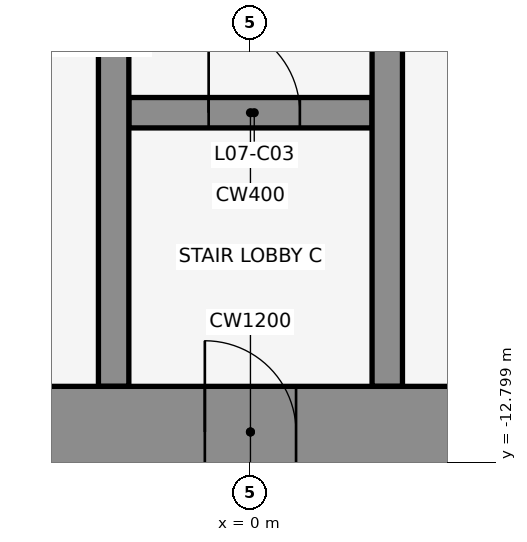
"""IFC4 building model, lengths in metres.
Left out: names, types, materials, properties, quantities, classifications, styles, units other than length and angle.
Written with IfcOpenShell. Run it as: python <this file> out.ifc"""

import sys

from ifc_helpers import new_model, si_unit, direction, frame, frame_2d, origin, place, context, subcontext, project, spatial, rectangle, extrude, element, fill, save


model = new_model("IFC4")
c1 = context("Model", 3, precision=1e-05, world=origin(), true_north=direction((0.0, 1.0)))
c2 = subcontext(c1, "Body", "Model", "MODEL_VIEW")
j1 = project(units=[si_unit("LENGTHUNIT", "METRE"), si_unit("PLANEANGLEUNIT", "RADIAN")], contexts=[c1])
p1 = place(None, origin())
s1 = spatial("IfcSite", under=j1, at=p1, CompositionType="ELEMENT")
p2 = place(p1, origin())
s2 = spatial("IfcBuilding", under=s1, at=p2, CompositionType="ELEMENT")
p3 = place(p2, frame((0.0, 0.0, 39.5)))
s3 = spatial("IfcBuildingStorey", under=s2, at=p3, CompositionType="ELEMENT", Elevation=39.5)
p4 = place(p3, frame((-1.6, -8.2, 0.0), z_axis=(0.0, 0.0, 1.0), x_axis=(1.0, 0.0, 0.0)))
e1 = element("IfcWall", 1, at=p4, inside=s3, PredefinedType="SHEAR", context=c2, shape_type="SweptSolid", body=[
    extrude(rectangle(XDim=3.2, YDim=0.4, at=frame_2d((1.6, 0.0))), origin(), (0.0, 0.0, 1.0), 4.5),
])
p5 = place(p4, frame((1.05, 0.0, 0.0)))
e2 = element("IfcOpeningElement", 2, at=p5, cuts=e1, PredefinedType="OPENING", context=c2, shape_type="SweptSolid", body=[
    extrude(rectangle(XDim=1.2, YDim=2.1, at=frame_2d((0.6, 1.05))), frame((0.0, 0.212, 0.0), z_axis=(0.0, -1.0, 0.0), x_axis=(1.0, 0.0, 0.0)), (0.0, 0.0, 1.0), 0.424),
])
for number, where, z_axis, x_axis in (
    (3, (-1.8, -11.8, 0.0), (0.0, 0.0, 1.0), (0.0, 1.0, 0.0)),
    (4, (1.8, -11.8, 0.0), (0.0, 0.0, 1.0), (0.0, 1.0, 0.0)),
):
    element("IfcWall", number, at=place(p3, frame(where, z_axis=z_axis, x_axis=x_axis)), inside=s3, PredefinedType="SHEAR", context=c2, shape_type="SweptSolid", body=[
        extrude(rectangle(XDim=10.6, YDim=0.4, at=frame_2d((5.3, 0.0))), origin(), (0.0, 0.0, 1.0), 4.5),
    ])
p6 = place(p3, frame((-22.0, -12.4, 0.0), z_axis=(0.0, 0.0, 1.0), x_axis=(1.0, 0.0, 0.0)))
e5 = element("IfcWall", 5, at=p6, inside=s3, PredefinedType="SHEAR", context=c2, shape_type="SweptSolid", body=[
    extrude(rectangle(XDim=44.0, YDim=1.2, at=frame_2d((22.0, 0.0))), origin(), (0.0, 0.0, 1.0), 4.5),
])
p7 = place(p6, frame((2.2, 0.0, 0.0)))
e6 = element("IfcOpeningElement", 6, at=p7, cuts=e5, PredefinedType="OPENING", context=c2, shape_type="SweptSolid", body=[
    extrude(rectangle(XDim=1.2, YDim=2.1, at=frame_2d((0.6, 1.05))), frame((0.0, 0.612, 0.0), z_axis=(0.0, -1.0, 0.0), x_axis=(1.0, 0.0, 0.0)), (0.0, 0.0, 1.0), 1.224),
])
p8 = place(p6, frame((21.4, 0.0, 0.0)))
e7 = element("IfcOpeningElement", 7, at=p8, cuts=e5, PredefinedType="OPENING", context=c2, shape_type="SweptSolid", body=[
    extrude(rectangle(XDim=1.2, YDim=2.1, at=frame_2d((0.6, 1.05))), frame((0.0, 0.612, 0.0), z_axis=(0.0, -1.0, 0.0), x_axis=(1.0, 0.0, 0.0)), (0.0, 0.0, 1.0), 1.224),
])
p9 = place(p6, frame((40.6, 0.0, 0.0)))
e8 = element("IfcOpeningElement", 8, at=p9, cuts=e5, PredefinedType="OPENING", context=c2, shape_type="SweptSolid", body=[
    extrude(rectangle(XDim=1.2, YDim=2.1, at=frame_2d((0.6, 1.05))), frame((0.0, 0.612, 0.0), z_axis=(0.0, -1.0, 0.0), x_axis=(1.0, 0.0, 0.0)), (0.0, 0.0, 1.0), 1.224),
])
p10 = place(p6, frame((16.0, 0.0, 0.0)))
e9 = element("IfcOpeningElement", 9, at=p10, cuts=e5, PredefinedType="OPENING", context=c2, shape_type="SweptSolid", body=[
    extrude(rectangle(XDim=1.8, YDim=2.1, at=frame_2d((0.9, 1.05))), frame((0.0, 0.612, 0.0), z_axis=(0.0, -1.0, 0.0), x_axis=(1.0, 0.0, 0.0)), (0.0, 0.0, 1.0), 1.224),
])
p11 = place(p6, frame((6.3, 0.0, 0.0)))
e10 = element("IfcOpeningElement", 10, at=p11, cuts=e5, PredefinedType="OPENING", context=c2, shape_type="SweptSolid", body=[
    extrude(rectangle(XDim=1.2, YDim=2.1, at=frame_2d((0.6, 1.05))), frame((0.0, 0.612, 0.0), z_axis=(0.0, -1.0, 0.0), x_axis=(1.0, 0.0, 0.0)), (0.0, 0.0, 1.0), 1.224),
])
p12 = place(p6, frame((26.2, 0.0, 0.0)))
e11 = element("IfcOpeningElement", 11, at=p12, cuts=e5, PredefinedType="OPENING", context=c2, shape_type="SweptSolid", body=[
    extrude(rectangle(XDim=1.8, YDim=2.1, at=frame_2d((0.9, 1.05))), frame((0.0, 0.612, 0.0), z_axis=(0.0, -1.0, 0.0), x_axis=(1.0, 0.0, 0.0)), (0.0, 0.0, 1.0), 1.224),
])
p13 = place(p6, frame((36.5, 0.0, 0.0)))
e12 = element("IfcOpeningElement", 12, at=p13, cuts=e5, PredefinedType="OPENING", context=c2, shape_type="SweptSolid", body=[
    extrude(rectangle(XDim=1.2, YDim=2.1, at=frame_2d((0.6, 1.05))), frame((0.0, 0.612, 0.0), z_axis=(0.0, -1.0, 0.0), x_axis=(1.0, 0.0, 0.0)), (0.0, 0.0, 1.0), 1.224),
])
p14 = place(p5, origin())
e13 = element("IfcDoor", 13, at=p14, inside=s3, OperationType="SINGLE_SWING_LEFT", PredefinedType="DOOR", context=c2, shape_type="SweptSolid", body=[
    extrude(rectangle(XDim=1.2, YDim=2.1, at=frame_2d((0.6, 1.05))), frame((0.0, 0.025, 0.0), z_axis=(0.0, -1.0, 0.0), x_axis=(1.0, 0.0, 0.0)), (0.0, 0.0, 1.0), 0.05),
])
fill(e2, e13)
p15 = place(p8, frame((1.2, 0.0, 0.0), z_axis=(0.0, 0.0, 1.0), x_axis=(-1.0, 0.0, 0.0)))
e14 = element("IfcDoor", 14, at=p15, inside=s3, OperationType="SINGLE_SWING_RIGHT", PredefinedType="DOOR", context=c2, shape_type="SweptSolid", body=[
    extrude(rectangle(XDim=1.2, YDim=2.1, at=frame_2d((0.6, 1.05))), frame((0.0, 0.025, 0.0), z_axis=(0.0, -1.0, 0.0), x_axis=(1.0, 0.0, 0.0)), (0.0, 0.0, 1.0), 0.05),
])
fill(e7, e14)
save(model, sys.argv[1])
